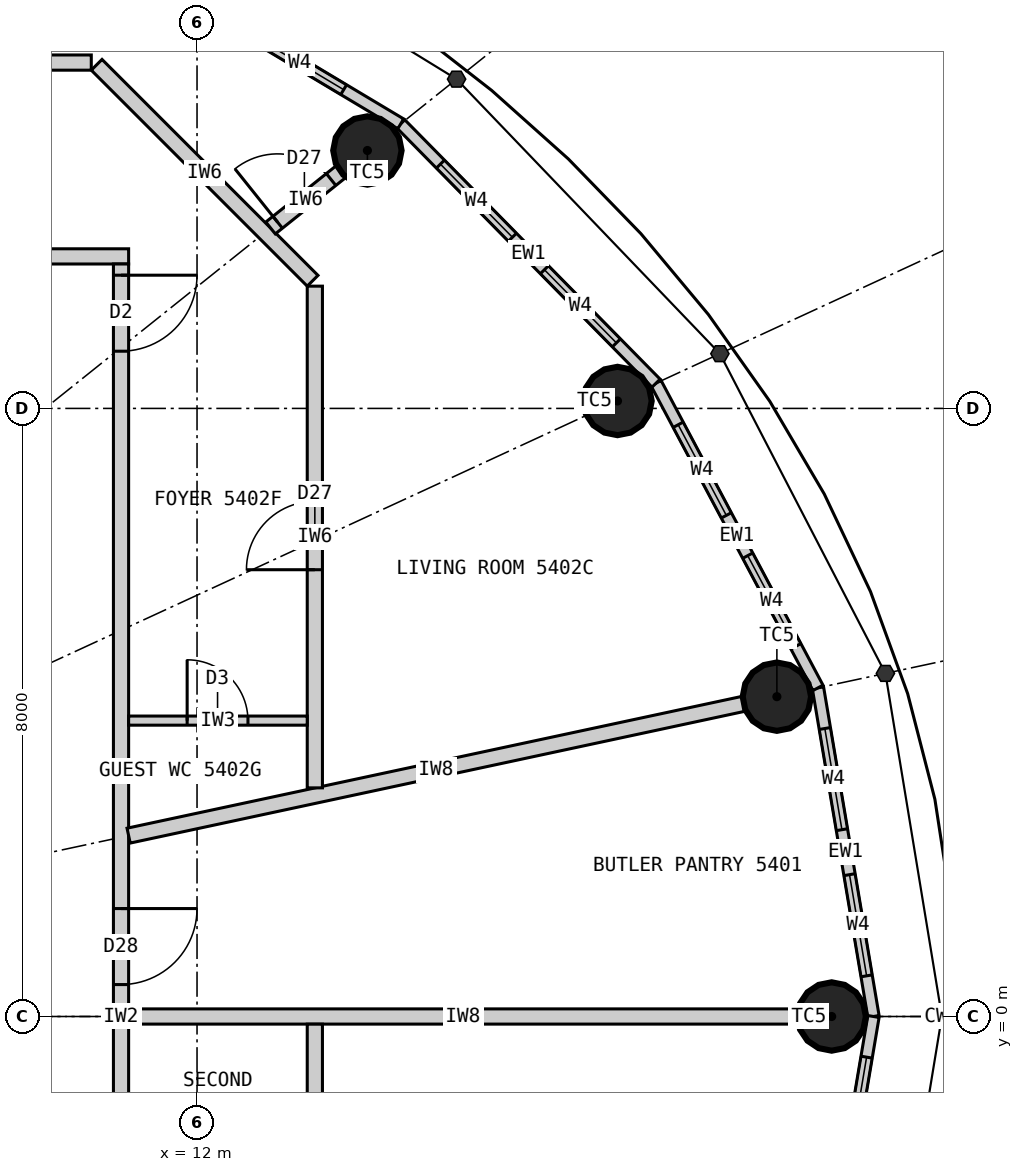
"""IFC4 building model, lengths in metres.
Left out: names, types, materials, properties, quantities, classifications, styles, units other than length and angle.
Written with IfcOpenShell. Run it as: python <this file> out.ifc"""

import sys

from ifc_helpers import new_model, si_unit, direction, frame, frame_2d, origin, origin_2d, place, context, subcontext, project, spatial, rectangle, circle, extrude, element, fill, save


model = new_model("IFC4")
c1 = context("Model", 3, precision=1e-05, world=origin(), true_north=direction((0.0, 1.0)))
c2 = subcontext(c1, "Body", "Model", "MODEL_VIEW")
j1 = project(units=[si_unit("LENGTHUNIT", "METRE"), si_unit("PLANEANGLEUNIT", "RADIAN")], contexts=[c1])
p1 = place(None, origin())
s1 = spatial("IfcSite", under=j1, at=p1, CompositionType="ELEMENT")
p2 = place(p1, origin())
s2 = spatial("IfcBuilding", under=s1, at=p2, CompositionType="ELEMENT")
p3 = place(p2, frame((0.0, 0.0, 202.8)))
s3 = spatial("IfcBuildingStorey", under=s2, at=p3, CompositionType="ELEMENT", Elevation=202.8)
for number, where, z_axis, x_axis in (
    (1, (20.35, 0.0, 0.0), (0.0, 0.0, 1.0), (1.0, 0.0, 0.0)),
    (2, (19.629, 4.208, 0.0), (0.0, 0.0, 1.0), (1.0, 0.0, 0.0)),
    (3, (17.532, 8.098, 0.0), (0.0, 0.0, 1.0), (1.0, 0.0, 0.0)),
    (4, (14.241, 11.393, 0.0), (0.0, 0.0, 1.0), (1.0, 0.0, 0.0)),
):
    element("IfcColumn", number, at=place(p3, frame(where, z_axis=z_axis, x_axis=x_axis)), inside=s3, PredefinedType="COLUMN", context=c2, shape_type="SweptSolid", body=[
        extrude(circle(Radius=0.45, at=origin_2d()), origin(), (0.0, 0.0, 1.0), 3.3),
    ])
p4 = place(p3, frame((20.9, 0.0, 0.0), z_axis=(0.0, 0.0, 1.0), x_axis=(-0.166538513568, 0.986034950445, 0.0)))
e5 = element("IfcWall", 5, at=p4, inside=s3, PredefinedType="ELEMENTEDWALL", context=c2, shape_type="SweptSolid", body=[
    extrude(rectangle(XDim=4.385, YDim=0.15, at=frame_2d((2.192, 0.0))), origin(), (0.0, 0.0, 1.0), 3.12),
])
p5 = place(p4, frame((0.542, 0.0, 0.9)))
e6 = element("IfcOpeningElement", 6, at=p5, cuts=e5, PredefinedType="OPENING", context=c2, shape_type="SweptSolid", body=[
    extrude(rectangle(XDim=1.35, YDim=1.9, at=frame_2d((0.675, 0.95))), frame((0.0, 0.085, 0.0), z_axis=(0.0, -1.0, 0.0), x_axis=(1.0, 0.0, 0.0)), (0.0, 0.0, 1.0), 0.17),
])
p6 = place(p4, frame((2.492, 0.0, 0.9)))
e7 = element("IfcOpeningElement", 7, at=p6, cuts=e5, PredefinedType="OPENING", context=c2, shape_type="SweptSolid", body=[
    extrude(rectangle(XDim=1.35, YDim=1.9, at=frame_2d((0.675, 0.95))), frame((0.0, 0.085, 0.0), z_axis=(0.0, -1.0, 0.0), x_axis=(1.0, 0.0, 0.0)), (0.0, 0.0, 1.0), 0.17),
])
p7 = place(p3, frame((20.17, 4.323, 0.0), z_axis=(0.0, 0.0, 1.0), x_axis=(-0.469256152955, 0.883062094597, 0.0)))
e8 = element("IfcWall", 8, at=p7, inside=s3, PredefinedType="ELEMENTEDWALL", context=c2, shape_type="SweptSolid", body=[
    extrude(rectangle(XDim=4.539, YDim=0.15, at=frame_2d((2.27, 0.0))), origin(), (0.0, 0.0, 1.0), 3.12),
])
p8 = place(p7, frame((0.62, 0.0, 0.9)))
e9 = element("IfcOpeningElement", 9, at=p8, cuts=e8, PredefinedType="OPENING", context=c2, shape_type="SweptSolid", body=[
    extrude(rectangle(XDim=1.35, YDim=1.9, at=frame_2d((0.675, 0.95))), frame((0.0, 0.085, 0.0), z_axis=(0.0, -1.0, 0.0), x_axis=(1.0, 0.0, 0.0)), (0.0, 0.0, 1.0), 0.17),
])
p9 = place(p7, frame((2.57, 0.0, 0.9)))
e10 = element("IfcOpeningElement", 10, at=p9, cuts=e8, PredefinedType="OPENING", context=c2, shape_type="SweptSolid", body=[
    extrude(rectangle(XDim=1.35, YDim=1.9, at=frame_2d((0.675, 0.95))), frame((0.0, 0.085, 0.0), z_axis=(0.0, -1.0, 0.0), x_axis=(1.0, 0.0, 0.0)), (0.0, 0.0, 1.0), 0.17),
])
p10 = place(p3, frame((18.04, 8.332, 0.0), z_axis=(0.0, 0.0, 1.0), x_axis=(-0.701527379618, 0.712642501993, 0.0)))
e11 = element("IfcWall", 11, at=p10, inside=s3, PredefinedType="ELEMENTEDWALL", context=c2, shape_type="SweptSolid", body=[
    extrude(rectangle(XDim=4.788, YDim=0.15, at=frame_2d((2.394, 0.0))), origin(), (0.0, 0.0, 1.0), 3.12),
])
p11 = place(p10, frame((0.744, 0.0, 0.9)))
e12 = element("IfcOpeningElement", 12, at=p11, cuts=e11, PredefinedType="OPENING", context=c2, shape_type="SweptSolid", body=[
    extrude(rectangle(XDim=1.35, YDim=1.9, at=frame_2d((0.675, 0.95))), frame((0.0, 0.085, 0.0), z_axis=(0.0, -1.0, 0.0), x_axis=(1.0, 0.0, 0.0)), (0.0, 0.0, 1.0), 0.17),
])
p12 = place(p10, frame((2.694, 0.0, 0.9)))
e13 = element("IfcOpeningElement", 13, at=p12, cuts=e11, PredefinedType="OPENING", context=c2, shape_type="SweptSolid", body=[
    extrude(rectangle(XDim=1.35, YDim=1.9, at=frame_2d((0.675, 0.95))), frame((0.0, 0.085, 0.0), z_axis=(0.0, -1.0, 0.0), x_axis=(1.0, 0.0, 0.0)), (0.0, 0.0, 1.0), 0.17),
])
p13 = place(p3, frame((14.68, 11.744, 0.0), z_axis=(0.0, 0.0, 1.0), x_axis=(-0.85822150553, 0.513279502265, 0.0)))
e14 = element("IfcWall", 14, at=p13, inside=s3, PredefinedType="ELEMENTEDWALL", context=c2, shape_type="SweptSolid", body=[
    extrude(rectangle(XDim=5.05, YDim=0.15, at=frame_2d((2.525, 0.0))), origin(), (0.0, 0.0, 1.0), 3.12),
])
p14 = place(p13, frame((0.875, 0.0, 0.9)))
e15 = element("IfcOpeningElement", 15, at=p14, cuts=e14, PredefinedType="OPENING", context=c2, shape_type="SweptSolid", body=[
    extrude(rectangle(XDim=1.35, YDim=1.9, at=frame_2d((0.675, 0.95))), frame((0.0, 0.085, 0.0), z_axis=(0.0, -1.0, 0.0), x_axis=(1.0, 0.0, 0.0)), (0.0, 0.0, 1.0), 0.17),
])
p15 = place(p13, frame((2.825, 0.0, 0.9)))
e16 = element("IfcOpeningElement", 16, at=p15, cuts=e14, PredefinedType="OPENING", context=c2, shape_type="SweptSolid", body=[
    extrude(rectangle(XDim=1.35, YDim=1.9, at=frame_2d((0.675, 0.95))), frame((0.0, 0.085, 0.0), z_axis=(0.0, -1.0, 0.0), x_axis=(1.0, 0.0, 0.0)), (0.0, 0.0, 1.0), 0.17),
])
p16 = place(p3, frame((20.17, -4.323, 0.0), z_axis=(0.0, 0.0, 1.0), x_axis=(0.166538513568, 0.986034950445, 0.0)))
e17 = element("IfcWall", 17, at=p16, inside=s3, PredefinedType="ELEMENTEDWALL", context=c2, shape_type="SweptSolid", body=[
    extrude(rectangle(XDim=4.385, YDim=0.15, at=frame_2d((2.192, 0.0))), origin(), (0.0, 0.0, 1.0), 3.12),
])
p17 = place(p16, frame((0.542, 0.0, 0.9)))
e18 = element("IfcOpeningElement", 18, at=p17, cuts=e17, PredefinedType="OPENING", context=c2, shape_type="SweptSolid", body=[
    extrude(rectangle(XDim=1.35, YDim=1.9, at=frame_2d((0.675, 0.95))), frame((0.0, 0.085, 0.0), z_axis=(0.0, -1.0, 0.0), x_axis=(1.0, 0.0, 0.0)), (0.0, 0.0, 1.0), 0.17),
])
p18 = place(p16, frame((2.492, 0.0, 0.9)))
e19 = element("IfcOpeningElement", 19, at=p18, cuts=e17, PredefinedType="OPENING", context=c2, shape_type="SweptSolid", body=[
    extrude(rectangle(XDim=1.35, YDim=1.9, at=frame_2d((0.675, 0.95))), frame((0.0, 0.085, 0.0), z_axis=(0.0, -1.0, 0.0), x_axis=(1.0, 0.0, 0.0)), (0.0, 0.0, 1.0), 0.17),
])
p19 = place(p3, frame((-11.1, 10.0, 0.0), z_axis=(0.0, 0.0, 1.0), x_axis=(1.0, 0.0, 0.0)))
e20 = element("IfcWall", 20, at=p19, inside=s3, PredefinedType="PARTITIONING", context=c2, shape_type="SweptSolid", body=[
    extrude(rectangle(XDim=22.2, YDim=0.2, at=frame_2d((11.1, 0.0))), origin(), (0.0, 0.0, 1.0), 3.12),
])
p20 = place(p19, frame((2.309, 0.0, 0.0)))
e21 = element("IfcOpeningElement", 21, at=p20, cuts=e20, PredefinedType="OPENING", context=c2, shape_type="SweptSolid", body=[
    extrude(rectangle(XDim=1.0, YDim=2.2, at=frame_2d((0.5, 1.1))), frame((0.0, 0.11, 0.0), z_axis=(0.0, -1.0, 0.0), x_axis=(1.0, 0.0, 0.0)), (0.0, 0.0, 1.0), 0.22),
])
p21 = place(p3, frame((11.0, -9.9, 0.0), z_axis=(0.0, 0.0, 1.0), x_axis=(0.0, 1.0, 0.0)))
e22 = element("IfcWall", 22, at=p21, inside=s3, PredefinedType="PARTITIONING", context=c2, shape_type="SweptSolid", body=[
    extrude(rectangle(XDim=19.8, YDim=0.2, at=frame_2d((9.9, 0.0))), origin(), (0.0, 0.0, 1.0), 3.12),
])
p22 = place(p21, frame((10.32, 0.0, 0.0)))
e23 = element("IfcOpeningElement", 23, at=p22, cuts=e22, PredefinedType="OPENING", context=c2, shape_type="SweptSolid", body=[
    extrude(rectangle(XDim=1.0, YDim=2.2, at=frame_2d((0.5, 1.1))), frame((0.0, 0.11, 0.0), z_axis=(0.0, -1.0, 0.0), x_axis=(1.0, 0.0, 0.0)), (0.0, 0.0, 1.0), 0.22),
])
p23 = place(p21, frame((18.653, 0.0, 0.0)))
e24 = element("IfcOpeningElement", 24, at=p23, cuts=e22, PredefinedType="OPENING", context=c2, shape_type="SweptSolid", body=[
    extrude(rectangle(XDim=1.0, YDim=2.2, at=frame_2d((0.5, 1.1))), frame((0.0, 0.11, 0.0), z_axis=(0.0, -1.0, 0.0), x_axis=(1.0, 0.0, 0.0)), (0.0, 0.0, 1.0), 0.22),
])
p24 = place(p21, frame((0.379, 0.0, 0.0)))
e25 = element("IfcOpeningElement", 25, at=p24, cuts=e22, PredefinedType="OPENING", context=c2, shape_type="SweptSolid", body=[
    extrude(rectangle(XDim=1.0, YDim=2.2, at=frame_2d((0.5, 1.1))), frame((0.0, 0.11, 0.0), z_axis=(0.0, -1.0, 0.0), x_axis=(1.0, 0.0, 0.0)), (0.0, 0.0, 1.0), 0.22),
])
p25 = place(p3, frame((11.1, 0.0, 0.0), z_axis=(0.0, 0.0, 1.0), x_axis=(1.0, 0.0, 0.0)))
e26 = element("IfcWall", 26, at=p25, inside=s3, PredefinedType="PARTITIONING", context=c2, shape_type="SweptSolid", body=[
    extrude(rectangle(XDim=8.8, YDim=0.2, at=frame_2d((4.4, 0.0))), origin(), (0.0, 0.0, 1.0), 2.37),
])
p26 = place(p3, frame((11.1, 2.379, 0.0), z_axis=(0.0, 0.0, 1.0), x_axis=(0.977789888126, 0.209587534647, 0.0)))
e27 = element("IfcWall", 27, at=p26, inside=s3, PredefinedType="PARTITIONING", context=c2, shape_type="SweptSolid", body=[
    extrude(rectangle(XDim=8.273, YDim=0.2, at=frame_2d((4.136, 0.0))), origin(), (0.0, 0.0, 1.0), 2.42),
])
p27 = place(p3, frame((13.55, 3.008, 0.0), z_axis=(0.0, 0.0, 1.0), x_axis=(0.0, 1.0, 0.0)))
e28 = element("IfcWall", 28, at=p27, inside=s3, PredefinedType="PARTITIONING", context=c2, shape_type="SweptSolid", body=[
    extrude(rectangle(XDim=6.601, YDim=0.2, at=frame_2d((3.3, 0.0))), origin(), (0.0, 0.0, 1.0), 3.12),
])
p28 = place(p27, frame((2.87, 0.0, 0.0)))
e29 = element("IfcOpeningElement", 29, at=p28, cuts=e28, PredefinedType="OPENING", context=c2, shape_type="SweptSolid", body=[
    extrude(rectangle(XDim=0.9, YDim=2.1, at=frame_2d((0.45, 1.05))), frame((0.0, 0.11, 0.0), z_axis=(0.0, -1.0, 0.0), x_axis=(1.0, 0.0, 0.0)), (0.0, 0.0, 1.0), 0.22),
])
p29 = place(p3, frame((13.521, 9.679, 0.0), z_axis=(0.0, 0.0, 1.0), x_axis=(-0.707106781187, 0.707106781187, 0.0)))
e30 = element("IfcWall", 30, at=p29, inside=s3, PredefinedType="PARTITIONING", context=c2, shape_type="SweptSolid", body=[
    extrude(rectangle(XDim=4.019, YDim=0.2, at=frame_2d((2.009, 0.0))), origin(), (0.0, 0.0, 1.0), 3.12),
])
p30 = place(p3, frame((10.609, 12.55, 0.0), z_axis=(0.0, 0.0, 1.0), x_axis=(-1.0, 0.0, 0.0)))
e31 = element("IfcWall", 31, at=p30, inside=s3, PredefinedType="PARTITIONING", context=c2, shape_type="SweptSolid", body=[
    extrude(rectangle(XDim=10.508, YDim=0.2, at=frame_2d((5.254, 0.0))), origin(), (0.0, 0.0, 1.0), 3.12),
])
p31 = place(p30, frame((6.588, 0.0, 0.0)))
e32 = element("IfcOpeningElement", 32, at=p31, cuts=e31, PredefinedType="OPENING", context=c2, shape_type="SweptSolid", body=[
    extrude(rectangle(XDim=0.9, YDim=2.1, at=frame_2d((0.45, 1.05))), frame((0.0, 0.11, 0.0), z_axis=(0.0, -1.0, 0.0), x_axis=(1.0, 0.0, 0.0)), (0.0, 0.0, 1.0), 0.22),
])
p32 = place(p30, frame((8.308, 0.0, 0.0)))
e33 = element("IfcOpeningElement", 33, at=p32, cuts=e31, PredefinedType="OPENING", context=c2, shape_type="SweptSolid", body=[
    extrude(rectangle(XDim=0.8, YDim=2.1, at=frame_2d((0.4, 1.05))), frame((0.0, 0.11, 0.0), z_axis=(0.0, -1.0, 0.0), x_axis=(1.0, 0.0, 0.0)), (0.0, 0.0, 1.0), 0.22),
])
p33 = place(p3, frame((12.968, 10.374, 0.0), z_axis=(0.0, 0.0, 1.0), x_axis=(0.780888968944, 0.624669847345, 0.0)))
e34 = element("IfcWall", 34, at=p33, inside=s3, PredefinedType="PARTITIONING", context=c2, shape_type="SweptSolid", body=[
    extrude(rectangle(XDim=1.181, YDim=0.2, at=frame_2d((0.591, 0.0))), origin(), (0.0, 0.0, 1.0), 2.42),
])
p34 = place(p33, frame((0.12, 0.0, 0.0)))
e35 = element("IfcOpeningElement", 35, at=p34, cuts=e34, PredefinedType="OPENING", context=c2, shape_type="SweptSolid", body=[
    extrude(rectangle(XDim=0.9, YDim=2.1, at=frame_2d((0.45, 1.05))), frame((0.0, 0.11, 0.0), z_axis=(0.0, -1.0, 0.0), x_axis=(1.0, 0.0, 0.0)), (0.0, 0.0, 1.0), 0.22),
])
p35 = place(p3, frame((11.1, 3.893, 0.0), z_axis=(0.0, 0.0, 1.0), x_axis=(1.0, 0.0, 0.0)))
e36 = element("IfcWall", 36, at=p35, inside=s3, PredefinedType="PARTITIONING", context=c2, shape_type="SweptSolid", body=[
    extrude(rectangle(XDim=2.35, YDim=0.12, at=frame_2d((1.175, 0.0))), origin(), (0.0, 0.0, 1.0), 3.12),
])
p36 = place(p35, frame((0.77, 0.0, 0.0)))
e37 = element("IfcOpeningElement", 37, at=p36, cuts=e36, PredefinedType="OPENING", context=c2, shape_type="SweptSolid", body=[
    extrude(rectangle(XDim=0.8, YDim=2.1, at=frame_2d((0.4, 1.05))), frame((0.0, 0.07, 0.0), z_axis=(0.0, -1.0, 0.0), x_axis=(1.0, 0.0, 0.0)), (0.0, 0.0, 1.0), 0.14),
])
p37 = place(p3, frame((13.55, -9.609, 0.0), z_axis=(0.0, 0.0, 1.0), x_axis=(0.0, 1.0, 0.0)))
e38 = element("IfcWall", 38, at=p37, inside=s3, PredefinedType="PARTITIONING", context=c2, shape_type="SweptSolid", body=[
    extrude(rectangle(XDim=9.508, YDim=0.2, at=frame_2d((4.754, 0.0))), origin(), (0.0, 0.0, 1.0), 3.12),
])
p38 = place(p37, frame((7.308, 0.0, 0.0)))
e39 = element("IfcOpeningElement", 39, at=p38, cuts=e38, PredefinedType="OPENING", context=c2, shape_type="SweptSolid", body=[
    extrude(rectangle(XDim=0.8, YDim=2.1, at=frame_2d((0.4, 1.05))), frame((0.0, 0.11, 0.0), z_axis=(0.0, -1.0, 0.0), x_axis=(1.0, 0.0, 0.0)), (0.0, 0.0, 1.0), 0.22),
])
p39 = place(p5, origin())
e40 = element("IfcWindow", 40, at=p39, inside=s3, PartitioningType="SINGLE_PANEL", PredefinedType="WINDOW", context=c2, shape_type="SweptSolid", body=[
    extrude(rectangle(XDim=1.35, YDim=1.9, at=frame_2d((0.675, 0.95))), frame((0.0, 0.03, 0.0), z_axis=(0.0, -1.0, 0.0), x_axis=(1.0, 0.0, 0.0)), (0.0, 0.0, 1.0), 0.06),
])
fill(e6, e40)
p40 = place(p6, origin())
e41 = element("IfcWindow", 41, at=p40, inside=s3, PartitioningType="SINGLE_PANEL", PredefinedType="WINDOW", context=c2, shape_type="SweptSolid", body=[
    extrude(rectangle(XDim=1.35, YDim=1.9, at=frame_2d((0.675, 0.95))), frame((0.0, 0.03, 0.0), z_axis=(0.0, -1.0, 0.0), x_axis=(1.0, 0.0, 0.0)), (0.0, 0.0, 1.0), 0.06),
])
fill(e7, e41)
p41 = place(p8, origin())
e42 = element("IfcWindow", 42, at=p41, inside=s3, PartitioningType="SINGLE_PANEL", PredefinedType="WINDOW", context=c2, shape_type="SweptSolid", body=[
    extrude(rectangle(XDim=1.35, YDim=1.9, at=frame_2d((0.675, 0.95))), frame((0.0, 0.03, 0.0), z_axis=(0.0, -1.0, 0.0), x_axis=(1.0, 0.0, 0.0)), (0.0, 0.0, 1.0), 0.06),
])
fill(e9, e42)
p42 = place(p9, origin())
e43 = element("IfcWindow", 43, at=p42, inside=s3, PartitioningType="SINGLE_PANEL", PredefinedType="WINDOW", context=c2, shape_type="SweptSolid", body=[
    extrude(rectangle(XDim=1.35, YDim=1.9, at=frame_2d((0.675, 0.95))), frame((0.0, 0.03, 0.0), z_axis=(0.0, -1.0, 0.0), x_axis=(1.0, 0.0, 0.0)), (0.0, 0.0, 1.0), 0.06),
])
fill(e10, e43)
p43 = place(p11, origin())
e44 = element("IfcWindow", 44, at=p43, inside=s3, PartitioningType="SINGLE_PANEL", PredefinedType="WINDOW", context=c2, shape_type="SweptSolid", body=[
    extrude(rectangle(XDim=1.35, YDim=1.9, at=frame_2d((0.675, 0.95))), frame((0.0, 0.03, 0.0), z_axis=(0.0, -1.0, 0.0), x_axis=(1.0, 0.0, 0.0)), (0.0, 0.0, 1.0), 0.06),
])
fill(e12, e44)
p44 = place(p12, origin())
e45 = element("IfcWindow", 45, at=p44, inside=s3, PartitioningType="SINGLE_PANEL", PredefinedType="WINDOW", context=c2, shape_type="SweptSolid", body=[
    extrude(rectangle(XDim=1.35, YDim=1.9, at=frame_2d((0.675, 0.95))), frame((0.0, 0.03, 0.0), z_axis=(0.0, -1.0, 0.0), x_axis=(1.0, 0.0, 0.0)), (0.0, 0.0, 1.0), 0.06),
])
fill(e13, e45)
p45 = place(p14, origin())
e46 = element("IfcWindow", 46, at=p45, inside=s3, PartitioningType="SINGLE_PANEL", PredefinedType="WINDOW", context=c2, shape_type="SweptSolid", body=[
    extrude(rectangle(XDim=1.35, YDim=1.9, at=frame_2d((0.675, 0.95))), frame((0.0, 0.03, 0.0), z_axis=(0.0, -1.0, 0.0), x_axis=(1.0, 0.0, 0.0)), (0.0, 0.0, 1.0), 0.06),
])
fill(e15, e46)
p46 = place(p18, origin())
e47 = element("IfcWindow", 47, at=p46, inside=s3, PartitioningType="SINGLE_PANEL", PredefinedType="WINDOW", context=c2, shape_type="SweptSolid", body=[
    extrude(rectangle(XDim=1.35, YDim=1.9, at=frame_2d((0.675, 0.95))), frame((0.0, 0.03, 0.0), z_axis=(0.0, -1.0, 0.0), x_axis=(1.0, 0.0, 0.0)), (0.0, 0.0, 1.0), 0.06),
])
fill(e19, e47)
p47 = place(p22, origin())
e48 = element("IfcDoor", 48, at=p47, inside=s3, OperationType="SINGLE_SWING_RIGHT", PredefinedType="DOOR", context=c2, shape_type="SweptSolid", body=[
    extrude(rectangle(XDim=1.0, YDim=2.2, at=frame_2d((0.5, 1.1))), frame((0.0, 0.025, 0.0), z_axis=(0.0, -1.0, 0.0), x_axis=(1.0, 0.0, 0.0)), (0.0, 0.0, 1.0), 0.05),
])
fill(e23, e48)
p48 = place(p23, origin())
e49 = element("IfcDoor", 49, at=p48, inside=s3, OperationType="SINGLE_SWING_RIGHT", PredefinedType="DOOR", context=c2, shape_type="SweptSolid", body=[
    extrude(rectangle(XDim=1.0, YDim=2.2, at=frame_2d((0.5, 1.1))), frame((0.0, 0.025, 0.0), z_axis=(0.0, -1.0, 0.0), x_axis=(1.0, 0.0, 0.0)), (0.0, 0.0, 1.0), 0.05),
])
fill(e24, e49)
p49 = place(p36, origin())
e50 = element("IfcDoor", 50, at=p49, inside=s3, OperationType="SINGLE_SWING_LEFT", PredefinedType="DOOR", context=c2, shape_type="SweptSolid", body=[
    extrude(rectangle(XDim=0.8, YDim=2.1, at=frame_2d((0.4, 1.05))), frame((0.0, 0.025, 0.0), z_axis=(0.0, -1.0, 0.0), x_axis=(1.0, 0.0, 0.0)), (0.0, 0.0, 1.0), 0.05),
])
fill(e37, e50)
p50 = place(p28, origin())
e51 = element("IfcDoor", 51, at=p50, inside=s3, OperationType="SINGLE_SWING_LEFT", PredefinedType="DOOR", context=c2, shape_type="SweptSolid", body=[
    extrude(rectangle(XDim=0.9, YDim=2.1, at=frame_2d((0.45, 1.05))), frame((0.0, 0.025, 0.0), z_axis=(0.0, -1.0, 0.0), x_axis=(1.0, 0.0, 0.0)), (0.0, 0.0, 1.0), 0.05),
])
fill(e29, e51)
p51 = place(p34, origin())
e52 = element("IfcDoor", 52, at=p51, inside=s3, OperationType="SINGLE_SWING_LEFT", PredefinedType="DOOR", context=c2, shape_type="SweptSolid", body=[
    extrude(rectangle(XDim=0.9, YDim=2.1, at=frame_2d((0.45, 1.05))), frame((0.0, 0.025, 0.0), z_axis=(0.0, -1.0, 0.0), x_axis=(1.0, 0.0, 0.0)), (0.0, 0.0, 1.0), 0.05),
])
fill(e35, e52)
save(model, sys.argv[1])
